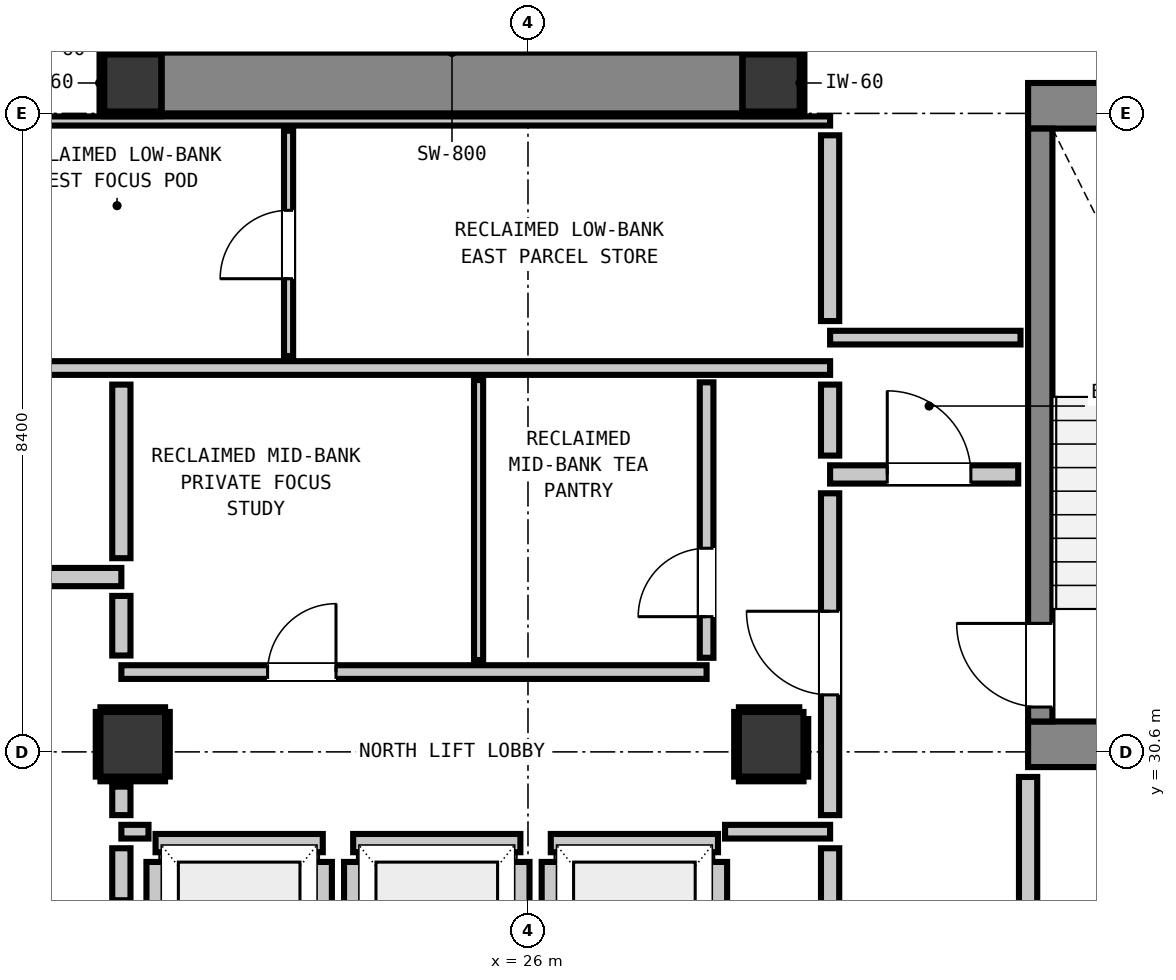
"""IFC4 building model, lengths in metres.
Left out: names, types, materials, properties, quantities, classifications, styles, units other than length and angle.
Written with IfcOpenShell. Run it as: python <this file> out.ifc"""

import sys

from ifc_helpers import new_model, si_unit, direction, frame, frame_2d, origin, origin_2d, place, context, subcontext, project, spatial, rectangle, extrude, element, fill, save


model = new_model("IFC4")
c1 = context("Model", 3, precision=1e-05, world=origin(), true_north=direction((0.0, 1.0)))
c2 = subcontext(c1, "Body", "Model", "MODEL_VIEW")
j1 = project(units=[si_unit("LENGTHUNIT", "METRE"), si_unit("PLANEANGLEUNIT", "RADIAN")], contexts=[c1])
p1 = place(None, origin())
s1 = spatial("IfcSite", under=j1, at=p1, CompositionType="ELEMENT")
p2 = place(p1, origin())
s2 = spatial("IfcBuilding", under=s1, at=p2, CompositionType="ELEMENT")
p3 = place(p2, frame((0.0, 0.0, 200.12)))
s3 = spatial("IfcBuildingStorey", under=s2, at=p3, CompositionType="ELEMENT", Elevation=200.12)
for number, where, z_axis, x_axis in (
    (1, (20.8, 39.4, 0.0), (0.0, 0.0, 1.0), (1.0, 0.0, 0.0)),
    (2, (29.2, 39.4, 0.0), (0.0, 0.0, 1.0), (1.0, 0.0, 0.0)),
):
    element("IfcColumn", number, at=place(p3, frame(where, z_axis=z_axis, x_axis=x_axis)), inside=s3, PredefinedType="COLUMN", context=c2, shape_type="SweptSolid", body=[
        extrude(rectangle(XDim=0.75, YDim=0.75, at=origin_2d()), origin(), (0.0, 0.0, 1.0), 3.32),
    ])
p4 = place(p3, frame((32.58, 39.1, 0.0), z_axis=(0.0, 0.0, 1.0), x_axis=(1.0, 0.0, 0.0)))
e3 = element("IfcWall", 3, at=p4, inside=s3, PredefinedType="SHEAR", context=c2, shape_type="SweptSolid", body=[
    extrude(rectangle(XDim=4.08, YDim=0.6, at=frame_2d((2.04, 0.0))), origin(), (0.0, 0.0, 1.0), 3.32),
])
p5 = place(p3, frame((32.58, 30.7, 0.0), z_axis=(0.0, 0.0, 1.0), x_axis=(1.0, 0.0, 0.0)))
e4 = element("IfcWall", 4, at=p5, inside=s3, PredefinedType="SHEAR", context=c2, shape_type="SweptSolid", body=[
    extrude(rectangle(XDim=3.54, YDim=0.6, at=frame_2d((1.77, 0.0))), origin(), (0.0, 0.0, 1.0), 3.32),
])
p6 = place(p3, frame((21.18, 39.4, 0.0), z_axis=(0.0, 0.0, 1.0), x_axis=(1.0, 0.0, 0.0)))
e5 = element("IfcWall", 5, at=p6, inside=s3, PredefinedType="SHEAR", context=c2, shape_type="SweptSolid", body=[
    extrude(rectangle(XDim=7.64, YDim=0.8, at=frame_2d((3.82, 0.0))), origin(), (0.0, 0.0, 1.0), 3.32),
])
p7 = place(p3, frame((32.74, 31.0, 0.0), z_axis=(0.0, 0.0, 1.0), x_axis=(0.0, 1.0, 0.0)))
e6 = element("IfcWall", 6, at=p7, inside=s3, PredefinedType="SHEAR", context=c2, shape_type="SweptSolid", body=[
    extrude(rectangle(XDim=7.8, YDim=0.32, at=frame_2d((3.9, 0.0))), origin(), (0.0, 0.0, 1.0), 3.32),
])
p8 = place(p7, frame((0.19, 0.0, 0.0)))
e7 = element("IfcOpeningElement", 7, at=p8, cuts=e6, PredefinedType="OPENING", context=c2, shape_type="SweptSolid", body=[
    extrude(rectangle(XDim=1.1, YDim=2.15, at=frame_2d((0.55, 1.075))), frame((0.0, 0.17, 0.0), z_axis=(0.0, -1.0, 0.0), x_axis=(1.0, 0.0, 0.0)), (0.0, 0.0, 1.0), 0.34),
])
for number, where, z_axis, x_axis in (
    (8, (20.8, 30.7, 0.0), (0.0, 0.0, 1.0), (1.0, 0.0, 0.0)),
    (9, (29.2, 30.7, 0.0), (0.0, 0.0, 1.0), (1.0, 0.0, 0.0)),
):
    element("IfcColumn", number, at=place(p3, frame(where, z_axis=z_axis, x_axis=x_axis)), inside=s3, PredefinedType="COLUMN", context=c2, shape_type="SweptSolid", body=[
        extrude(rectangle(XDim=0.85, YDim=0.85, at=origin_2d()), origin(), (0.0, 0.0, 1.0), 3.32),
    ])
p9 = place(p3, frame((21.1, 29.4, 0.0), z_axis=(0.0, 0.0, 1.0), x_axis=(1.0, 0.0, 0.0)))
e10 = element("IfcWall", 10, at=p9, inside=s3, PredefinedType="PARTITIONING", context=c2, shape_type="SweptSolid", body=[
    extrude(rectangle(XDim=2.2, YDim=0.24, at=frame_2d((1.1, 0.0))), origin(), (0.0, 0.0, 1.0), 3.1),
])
p10 = place(p3, frame((21.1, 27.048, 0.0), z_axis=(0.0, 0.0, 1.0), x_axis=(0.0, 1.0, 0.0)))
e11 = element("IfcWall", 11, at=p10, inside=s3, PredefinedType="PARTITIONING", context=c2, shape_type="SweptSolid", body=[
    extrude(rectangle(XDim=2.104, YDim=0.24, at=frame_2d((1.052, 0.0))), origin(), (0.0, 0.0, 1.0), 2.335),
])
p11 = place(p3, frame((23.3, 27.048, 0.0), z_axis=(0.0, 0.0, 1.0), x_axis=(0.0, 1.0, 0.0)))
e12 = element("IfcWall", 12, at=p11, inside=s3, PredefinedType="PARTITIONING", context=c2, shape_type="SweptSolid", body=[
    extrude(rectangle(XDim=2.104, YDim=0.24, at=frame_2d((1.052, 0.0))), origin(), (0.0, 0.0, 1.0), 3.1),
])
p12 = place(p3, frame((23.7, 29.4, 0.0), z_axis=(0.0, 0.0, 1.0), x_axis=(1.0, 0.0, 0.0)))
e13 = element("IfcWall", 13, at=p12, inside=s3, PredefinedType="PARTITIONING", context=c2, shape_type="SweptSolid", body=[
    extrude(rectangle(XDim=2.2, YDim=0.24, at=frame_2d((1.1, 0.0))), origin(), (0.0, 0.0, 1.0), 3.1),
])
for number, where, z_axis, x_axis in (
    (14, (23.7, 27.048, 0.0), (0.0, 0.0, 1.0), (0.0, 1.0, 0.0)),
    (15, (25.9, 27.048, 0.0), (0.0, 0.0, 1.0), (0.0, 1.0, 0.0)),
):
    element("IfcWall", number, at=place(p3, frame(where, z_axis=z_axis, x_axis=x_axis)), inside=s3, PredefinedType="PARTITIONING", context=c2, shape_type="SweptSolid", body=[
        extrude(rectangle(XDim=2.104, YDim=0.24, at=frame_2d((1.052, 0.0))), origin(), (0.0, 0.0, 1.0), 3.1),
    ])
p13 = place(p3, frame((26.3, 29.4, 0.0), z_axis=(0.0, 0.0, 1.0), x_axis=(1.0, 0.0, 0.0)))
e16 = element("IfcWall", 16, at=p13, inside=s3, PredefinedType="PARTITIONING", context=c2, shape_type="SweptSolid", body=[
    extrude(rectangle(XDim=2.2, YDim=0.24, at=frame_2d((1.1, 0.0))), origin(), (0.0, 0.0, 1.0), 3.1),
])
p14 = place(p3, frame((26.3, 27.048, 0.0), z_axis=(0.0, 0.0, 1.0), x_axis=(0.0, 1.0, 0.0)))
e17 = element("IfcWall", 17, at=p14, inside=s3, PredefinedType="PARTITIONING", context=c2, shape_type="SweptSolid", body=[
    extrude(rectangle(XDim=2.104, YDim=0.24, at=frame_2d((1.052, 0.0))), origin(), (0.0, 0.0, 1.0), 3.1),
])
p15 = place(p3, frame((28.5, 27.33, 0.0), z_axis=(0.0, 0.0, 1.0), x_axis=(0.0, 1.0, 0.0)))
e18 = element("IfcWall", 18, at=p15, inside=s3, PredefinedType="PARTITIONING", context=c2, shape_type="SweptSolid", body=[
    extrude(rectangle(XDim=1.822, YDim=0.24, at=frame_2d((0.911, 0.0))), origin(), (0.0, 0.0, 1.0), 3.1),
])
p16 = place(p3, frame((17.45, 32.9, 0.0), z_axis=(0.0, 0.0, 1.0), x_axis=(1.0, 0.0, 0.0)))
e19 = element("IfcWall", 19, at=p16, inside=s3, PredefinedType="PARTITIONING", context=c2, shape_type="SweptSolid", body=[
    extrude(rectangle(XDim=3.2, YDim=0.24, at=frame_2d((1.6, 0.0))), origin(), (0.0, 0.0, 1.0), 3.1),
])
p17 = place(p16, frame((0.159, 0.0, 0.0)))
e20 = element("IfcOpeningElement", 20, at=p17, cuts=e19, PredefinedType="OPENING", context=c2, shape_type="SweptSolid", body=[
    extrude(rectangle(XDim=1.1, YDim=2.15, at=frame_2d((0.55, 1.075))), frame((0.0, 0.13, 0.0), z_axis=(0.0, -1.0, 0.0), x_axis=(1.0, 0.0, 0.0)), (0.0, 0.0, 1.0), 0.26),
])
p18 = place(p3, frame((29.975, 34.25, 0.0), z_axis=(0.0, 0.0, 1.0), x_axis=(1.0, 0.0, 0.0)))
e21 = element("IfcWall", 21, at=p18, inside=s3, PredefinedType="PARTITIONING", context=c2, shape_type="SweptSolid", body=[
    extrude(rectangle(XDim=2.475, YDim=0.24, at=frame_2d((1.237, 0.0))), origin(), (0.0, 0.0, 1.0), 3.1),
])
p19 = place(p18, frame((0.752, 0.0, 0.0)))
e22 = element("IfcOpeningElement", 22, at=p19, cuts=e21, PredefinedType="OPENING", context=c2, shape_type="SweptSolid", body=[
    extrude(rectangle(XDim=1.1, YDim=2.15, at=frame_2d((0.55, 1.075))), frame((0.0, 0.13, 0.0), z_axis=(0.0, -1.0, 0.0), x_axis=(1.0, 0.0, 0.0)), (0.0, 0.0, 1.0), 0.26),
])
p20 = place(p3, frame((20.65, 29.55, 0.0), z_axis=(0.0, 0.0, 1.0), x_axis=(1.0, 0.0, 0.0)))
e23 = element("IfcWall", 23, at=p20, inside=s3, PredefinedType="PARTITIONING", context=c2, shape_type="SweptSolid", body=[
    extrude(rectangle(XDim=0.357, YDim=0.18, at=frame_2d((0.179, 0.0))), origin(), (0.0, 0.0, 1.0), 3.1),
])
p21 = place(p3, frame((28.593, 29.55, 0.0), z_axis=(0.0, 0.0, 1.0), x_axis=(1.0, 0.0, 0.0)))
e24 = element("IfcWall", 24, at=p21, inside=s3, PredefinedType="PARTITIONING", context=c2, shape_type="SweptSolid", body=[
    extrude(rectangle(XDim=1.382, YDim=0.18, at=frame_2d((0.691, 0.0))), origin(), (0.0, 0.0, 1.0), 3.1),
])
p22 = place(p3, frame((20.65, 31.65, 0.0), z_axis=(0.0, 0.0, 1.0), x_axis=(1.0, 0.0, 0.0)))
e25 = element("IfcWall", 25, at=p22, inside=s3, PredefinedType="PARTITIONING", context=c2, shape_type="SweptSolid", body=[
    extrude(rectangle(XDim=7.7, YDim=0.18, at=frame_2d((3.85, 0.0))), origin(), (0.0, 0.0, 1.0), 3.1),
])
p23 = place(p22, frame((1.924, 0.0, 0.0)))
e26 = element("IfcOpeningElement", 26, at=p23, cuts=e25, PredefinedType="OPENING", context=c2, shape_type="SweptSolid", body=[
    extrude(rectangle(XDim=0.9, YDim=2.1, at=frame_2d((0.45, 1.05))), frame((0.0, 0.1, 0.0), z_axis=(0.0, -1.0, 0.0), x_axis=(1.0, 0.0, 0.0)), (0.0, 0.0, 1.0), 0.2),
])
p24 = place(p3, frame((18.95, 35.65, 0.0), z_axis=(0.0, 0.0, 1.0), x_axis=(1.0, 0.0, 0.0)))
e27 = element("IfcWall", 27, at=p24, inside=s3, PredefinedType="PARTITIONING", context=c2, shape_type="SweptSolid", body=[
    extrude(rectangle(XDim=11.025, YDim=0.18, at=frame_2d((5.513, 0.0))), origin(), (0.0, 0.0, 1.0), 3.1),
])
p25 = place(p3, frame((29.975, 36.05, 0.0), z_axis=(0.0, 0.0, 1.0), x_axis=(1.0, 0.0, 0.0)))
e28 = element("IfcWall", 28, at=p25, inside=s3, PredefinedType="PARTITIONING", context=c2, shape_type="SweptSolid", body=[
    extrude(rectangle(XDim=2.505, YDim=0.18, at=frame_2d((1.252, 0.0))), origin(), (0.0, 0.0, 1.0), 3.1),
])
p26 = place(p3, frame((18.95, 38.9, 0.0), z_axis=(0.0, 0.0, 1.0), x_axis=(1.0, 0.0, 0.0)))
e29 = element("IfcWall", 29, at=p26, inside=s3, PredefinedType="PARTITIONING", context=c2, shape_type="SweptSolid", body=[
    extrude(rectangle(XDim=11.025, YDim=0.12, at=frame_2d((5.513, 0.0))), origin(), (0.0, 0.0, 1.0), 3.1),
])
p27 = place(p3, frame((20.65, 28.648, 0.0), z_axis=(0.0, 0.0, 1.0), x_axis=(0.0, 1.0, 0.0)))
e30 = element("IfcWall", 30, at=p27, inside=s3, PredefinedType="PARTITIONING", context=c2, shape_type="SweptSolid", body=[
    extrude(rectangle(XDim=0.684, YDim=0.24, at=frame_2d((0.342, 0.0))), origin(), (0.0, 0.0, 1.0), 2.335),
])
p28 = place(p3, frame((20.65, 29.768, 0.0), z_axis=(0.0, 0.0, 1.0), x_axis=(0.0, 1.0, 0.0)))
e31 = element("IfcWall", 31, at=p28, inside=s3, PredefinedType="PARTITIONING", context=c2, shape_type="SweptSolid", body=[
    extrude(rectangle(XDim=0.375, YDim=0.24, at=frame_2d((0.188, 0.0))), origin(), (0.0, 0.0, 1.0), 2.335),
])
p29 = place(p3, frame((20.65, 31.868, 0.0), z_axis=(0.0, 0.0, 1.0), x_axis=(0.0, 1.0, 0.0)))
e32 = element("IfcWall", 32, at=p29, inside=s3, PredefinedType="PARTITIONING", context=c2, shape_type="SweptSolid", body=[
    extrude(rectangle(XDim=0.784, YDim=0.24, at=frame_2d((0.392, 0.0))), origin(), (0.0, 0.0, 1.0), 2.335),
])
p30 = place(p3, frame((20.65, 33.148, 0.0), z_axis=(0.0, 0.0, 1.0), x_axis=(0.0, 1.0, 0.0)))
e33 = element("IfcWall", 33, at=p30, inside=s3, PredefinedType="PARTITIONING", context=c2, shape_type="SweptSolid", body=[
    extrude(rectangle(XDim=2.284, YDim=0.24, at=frame_2d((1.142, 0.0))), origin(), (0.0, 0.0, 1.0), 2.335),
])
p31 = place(p3, frame((29.975, 25.648, 0.0), z_axis=(0.0, 0.0, 1.0), x_axis=(0.0, 1.0, 0.0)))
e34 = element("IfcWall", 34, at=p31, inside=s3, PredefinedType="PARTITIONING", context=c2, shape_type="SweptSolid", body=[
    extrude(rectangle(XDim=3.684, YDim=0.24, at=frame_2d((1.842, 0.0))), origin(), (0.0, 0.0, 1.0), 3.1),
])
p32 = place(p3, frame((29.975, 29.768, 0.0), z_axis=(0.0, 0.0, 1.0), x_axis=(0.0, 1.0, 0.0)))
e35 = element("IfcWall", 35, at=p32, inside=s3, PredefinedType="PARTITIONING", context=c2, shape_type="SweptSolid", body=[
    extrude(rectangle(XDim=4.234, YDim=0.24, at=frame_2d((2.117, 0.0))), origin(), (0.0, 0.0, 1.0), 3.1),
])
p33 = place(p32, frame((1.582, 0.0, 0.0)))
e36 = element("IfcOpeningElement", 36, at=p33, cuts=e35, PredefinedType="OPENING", context=c2, shape_type="SweptSolid", body=[
    extrude(rectangle(XDim=1.1, YDim=2.15, at=frame_2d((0.55, 1.075))), frame((0.0, 0.13, 0.0), z_axis=(0.0, -1.0, 0.0), x_axis=(1.0, 0.0, 0.0)), (0.0, 0.0, 1.0), 0.26),
])
p34 = place(p3, frame((29.975, 34.498, 0.0), z_axis=(0.0, 0.0, 1.0), x_axis=(0.0, 1.0, 0.0)))
e37 = element("IfcWall", 37, at=p34, inside=s3, PredefinedType="PARTITIONING", context=c2, shape_type="SweptSolid", body=[
    extrude(rectangle(XDim=0.934, YDim=0.24, at=frame_2d((0.467, 0.0))), origin(), (0.0, 0.0, 1.0), 3.1),
])
p35 = place(p3, frame((29.975, 36.268, 0.0), z_axis=(0.0, 0.0, 1.0), x_axis=(0.0, 1.0, 0.0)))
e38 = element("IfcWall", 38, at=p35, inside=s3, PredefinedType="PARTITIONING", context=c2, shape_type="SweptSolid", body=[
    extrude(rectangle(XDim=2.444, YDim=0.24, at=frame_2d((1.222, 0.0))), origin(), (0.0, 0.0, 1.0), 3.1),
])
p36 = place(p3, frame((32.58, 25.648, 0.0), z_axis=(0.0, 0.0, 1.0), x_axis=(0.0, 1.0, 0.0)))
e39 = element("IfcWall", 39, at=p36, inside=s3, PredefinedType="PARTITIONING", context=c2, shape_type="SweptSolid", body=[
    extrude(rectangle(XDim=4.622, YDim=0.24, at=frame_2d((2.311, 0.0))), origin(), (0.0, 0.0, 1.0), 3.1),
])
p37 = place(p3, frame((28.35, 31.838, 0.0), z_axis=(0.0, 0.0, 1.0), x_axis=(0.0, 1.0, 0.0)))
e40 = element("IfcWall", 40, at=p37, inside=s3, PredefinedType="PARTITIONING", context=c2, shape_type="SweptSolid", body=[
    extrude(rectangle(XDim=3.624, YDim=0.18, at=frame_2d((1.812, 0.0))), origin(), (0.0, 0.0, 1.0), 3.1),
])
p38 = place(p37, frame((0.541, 0.0, 0.0)))
e41 = element("IfcOpeningElement", 41, at=p38, cuts=e40, PredefinedType="OPENING", context=c2, shape_type="SweptSolid", body=[
    extrude(rectangle(XDim=0.9, YDim=2.1, at=frame_2d((0.45, 1.05))), frame((0.0, 0.1, 0.0), z_axis=(0.0, -1.0, 0.0), x_axis=(1.0, 0.0, 0.0)), (0.0, 0.0, 1.0), 0.2),
])
p39 = place(p3, frame((22.85, 35.808, 0.0), z_axis=(0.0, 0.0, 1.0), x_axis=(0.0, 1.0, 0.0)))
e42 = element("IfcWall", 42, at=p39, inside=s3, PredefinedType="PARTITIONING", context=c2, shape_type="SweptSolid", body=[
    extrude(rectangle(XDim=2.964, YDim=0.12, at=frame_2d((1.482, 0.0))), origin(), (0.0, 0.0, 1.0), 3.1),
])
p40 = place(p39, frame((1.017, 0.0, 0.0)))
e43 = element("IfcOpeningElement", 43, at=p40, cuts=e42, PredefinedType="OPENING", context=c2, shape_type="SweptSolid", body=[
    extrude(rectangle(XDim=0.9, YDim=2.1, at=frame_2d((0.45, 1.05))), frame((0.0, 0.07, 0.0), z_axis=(0.0, -1.0, 0.0), x_axis=(1.0, 0.0, 0.0)), (0.0, 0.0, 1.0), 0.14),
])
p41 = place(p3, frame((25.35, 31.808, 0.0), z_axis=(0.0, 0.0, 1.0), x_axis=(0.0, 1.0, 0.0)))
e44 = element("IfcWall", 44, at=p41, inside=s3, PredefinedType="PARTITIONING", context=c2, shape_type="SweptSolid", body=[
    extrude(rectangle(XDim=3.684, YDim=0.12, at=frame_2d((1.842, 0.0))), origin(), (0.0, 0.0, 1.0), 3.1),
])
for number, where, z_axis, x_axis in (
    (45, (20.425, 38.993, 0.0), (0.0, 0.0, 1.0), (1.0, 0.0, 0.0)),
    (46, (20.425, 39.807, 0.0), (0.0, 0.0, 1.0), (1.0, 0.0, 0.0)),
):
    element("IfcWall", number, at=place(p3, frame(where, z_axis=z_axis, x_axis=x_axis)), inside=s3, PredefinedType="PARTITIONING", context=c2, shape_type="SweptSolid", body=[
        extrude(rectangle(XDim=0.742, YDim=0.06, at=frame_2d((0.371, 0.0))), origin(), (0.0, 0.0, 1.0), 1.45),
    ])
p42 = place(p3, frame((20.393, 39.025, 0.0), z_axis=(0.0, 0.0, 1.0), x_axis=(0.0, 1.0, 0.0)))
e47 = element("IfcWall", 47, at=p42, inside=s3, PredefinedType="PARTITIONING", context=c2, shape_type="SweptSolid", body=[
    extrude(rectangle(XDim=0.75, YDim=0.06, at=frame_2d((0.375, 0.0))), origin(), (0.0, 0.0, 1.0), 1.45),
])
for number, where, z_axis, x_axis in (
    (48, (28.833, 38.993, 0.0), (0.0, 0.0, 1.0), (1.0, 0.0, 0.0)),
    (49, (28.833, 39.807, 0.0), (0.0, 0.0, 1.0), (1.0, 0.0, 0.0)),
):
    element("IfcWall", number, at=place(p3, frame(where, z_axis=z_axis, x_axis=x_axis)), inside=s3, PredefinedType="PARTITIONING", context=c2, shape_type="SweptSolid", body=[
        extrude(rectangle(XDim=0.742, YDim=0.06, at=frame_2d((0.371, 0.0))), origin(), (0.0, 0.0, 1.0), 1.45),
    ])
p43 = place(p3, frame((29.607, 39.025, 0.0), z_axis=(0.0, 0.0, 1.0), x_axis=(0.0, 1.0, 0.0)))
e50 = element("IfcWall", 50, at=p43, inside=s3, PredefinedType="PARTITIONING", context=c2, shape_type="SweptSolid", body=[
    extrude(rectangle(XDim=0.75, YDim=0.06, at=frame_2d((0.375, 0.0))), origin(), (0.0, 0.0, 1.0), 1.45),
])
for number, where, z_axis, x_axis in (
    (51, (20.375, 30.243, 0.0), (0.0, 0.0, 1.0), (1.0, 0.0, 0.0)),
    (52, (20.375, 31.157, 0.0), (0.0, 0.0, 1.0), (1.0, 0.0, 0.0)),
    (53, (20.343, 30.275, 0.0), (0.0, 0.0, 1.0), (0.0, 1.0, 0.0)),
    (54, (21.257, 30.275, 0.0), (0.0, 0.0, 1.0), (0.0, 1.0, 0.0)),
    (55, (28.775, 30.243, 0.0), (0.0, 0.0, 1.0), (1.0, 0.0, 0.0)),
):
    element("IfcWall", number, at=place(p3, frame(where, z_axis=z_axis, x_axis=x_axis)), inside=s3, PredefinedType="PARTITIONING", context=c2, shape_type="SweptSolid", body=[
        extrude(rectangle(XDim=0.85, YDim=0.06, at=frame_2d((0.425, 0.0))), origin(), (0.0, 0.0, 1.0), 1.45),
    ])
p44 = place(p3, frame((28.775, 31.157, 0.0), z_axis=(0.0, 0.0, 1.0), x_axis=(1.0, 0.0, 0.0)))
e56 = element("IfcWall", 56, at=p44, inside=s3, PredefinedType="PARTITIONING", context=c2, shape_type="SweptSolid", body=[
    extrude(rectangle(XDim=0.794, YDim=0.06, at=frame_2d((0.397, 0.0))), origin(), (0.0, 0.0, 1.0), 1.45),
])
p45 = place(p3, frame((28.743, 30.275, 0.0), z_axis=(0.0, 0.0, 1.0), x_axis=(0.0, 1.0, 0.0)))
e57 = element("IfcWall", 57, at=p45, inside=s3, PredefinedType="PARTITIONING", context=c2, shape_type="SweptSolid", body=[
    extrude(rectangle(XDim=0.85, YDim=0.06, at=frame_2d((0.425, 0.0))), origin(), (0.0, 0.0, 1.0), 1.45),
])
p46 = place(p3, frame((29.657, 30.275, 0.0), z_axis=(0.0, 0.0, 1.0), x_axis=(0.0, 1.0, 0.0)))
e58 = element("IfcWall", 58, at=p46, inside=s3, PredefinedType="PARTITIONING", context=c2, shape_type="SweptSolid", body=[
    extrude(rectangle(XDim=0.757, YDim=0.06, at=frame_2d((0.378, 0.0))), origin(), (0.0, 0.0, 1.0), 1.45),
])
p47 = place(p8, origin())
e59 = element("IfcDoor", 59, at=p47, inside=s3, OperationType="SINGLE_SWING_RIGHT", PredefinedType="DOOR", context=c2, shape_type="SweptSolid", body=[
    extrude(rectangle(XDim=1.1, YDim=2.15, at=frame_2d((0.55, 1.075))), frame((0.0, 0.025, 0.0), z_axis=(0.0, -1.0, 0.0), x_axis=(1.0, 0.0, 0.0)), (0.0, 0.0, 1.0), 0.05),
])
fill(e7, e59)
p48 = place(p33, origin())
e60 = element("IfcDoor", 60, at=p48, inside=s3, OperationType="SINGLE_SWING_RIGHT", PredefinedType="DOOR", context=c2, shape_type="SweptSolid", body=[
    extrude(rectangle(XDim=1.1, YDim=2.15, at=frame_2d((0.55, 1.075))), frame((0.0, 0.025, 0.0), z_axis=(0.0, -1.0, 0.0), x_axis=(1.0, 0.0, 0.0)), (0.0, 0.0, 1.0), 0.05),
])
fill(e36, e60)
p49 = place(p19, origin())
e61 = element("IfcDoor", 61, at=p49, inside=s3, OperationType="SINGLE_SWING_LEFT", PredefinedType="DOOR", context=c2, shape_type="SweptSolid", body=[
    extrude(rectangle(XDim=1.1, YDim=2.15, at=frame_2d((0.55, 1.075))), frame((0.0, 0.025, 0.0), z_axis=(0.0, -1.0, 0.0), x_axis=(1.0, 0.0, 0.0)), (0.0, 0.0, 1.0), 0.05),
])
fill(e22, e61)
p50 = place(p40, origin())
e62 = element("IfcDoor", 62, at=p50, inside=s3, OperationType="SINGLE_SWING_LEFT", PredefinedType="DOOR", context=c2, shape_type="SweptSolid", body=[
    extrude(rectangle(XDim=0.9, YDim=2.1, at=frame_2d((0.45, 1.05))), frame((0.0, 0.025, 0.0), z_axis=(0.0, -1.0, 0.0), x_axis=(1.0, 0.0, 0.0)), (0.0, 0.0, 1.0), 0.05),
])
fill(e43, e62)
p51 = place(p23, origin())
e63 = element("IfcDoor", 63, at=p51, inside=s3, OperationType="SINGLE_SWING_RIGHT", PredefinedType="DOOR", context=c2, shape_type="SweptSolid", body=[
    extrude(rectangle(XDim=0.9, YDim=2.1, at=frame_2d((0.45, 1.05))), frame((0.0, 0.025, 0.0), z_axis=(0.0, -1.0, 0.0), x_axis=(1.0, 0.0, 0.0)), (0.0, 0.0, 1.0), 0.05),
])
fill(e26, e63)
p52 = place(p38, origin())
e64 = element("IfcDoor", 64, at=p52, inside=s3, OperationType="SINGLE_SWING_LEFT", PredefinedType="DOOR", context=c2, shape_type="SweptSolid", body=[
    extrude(rectangle(XDim=0.9, YDim=2.1, at=frame_2d((0.45, 1.05))), frame((0.0, 0.025, 0.0), z_axis=(0.0, -1.0, 0.0), x_axis=(1.0, 0.0, 0.0)), (0.0, 0.0, 1.0), 0.05),
])
fill(e41, e64)
save(model, sys.argv[1])
